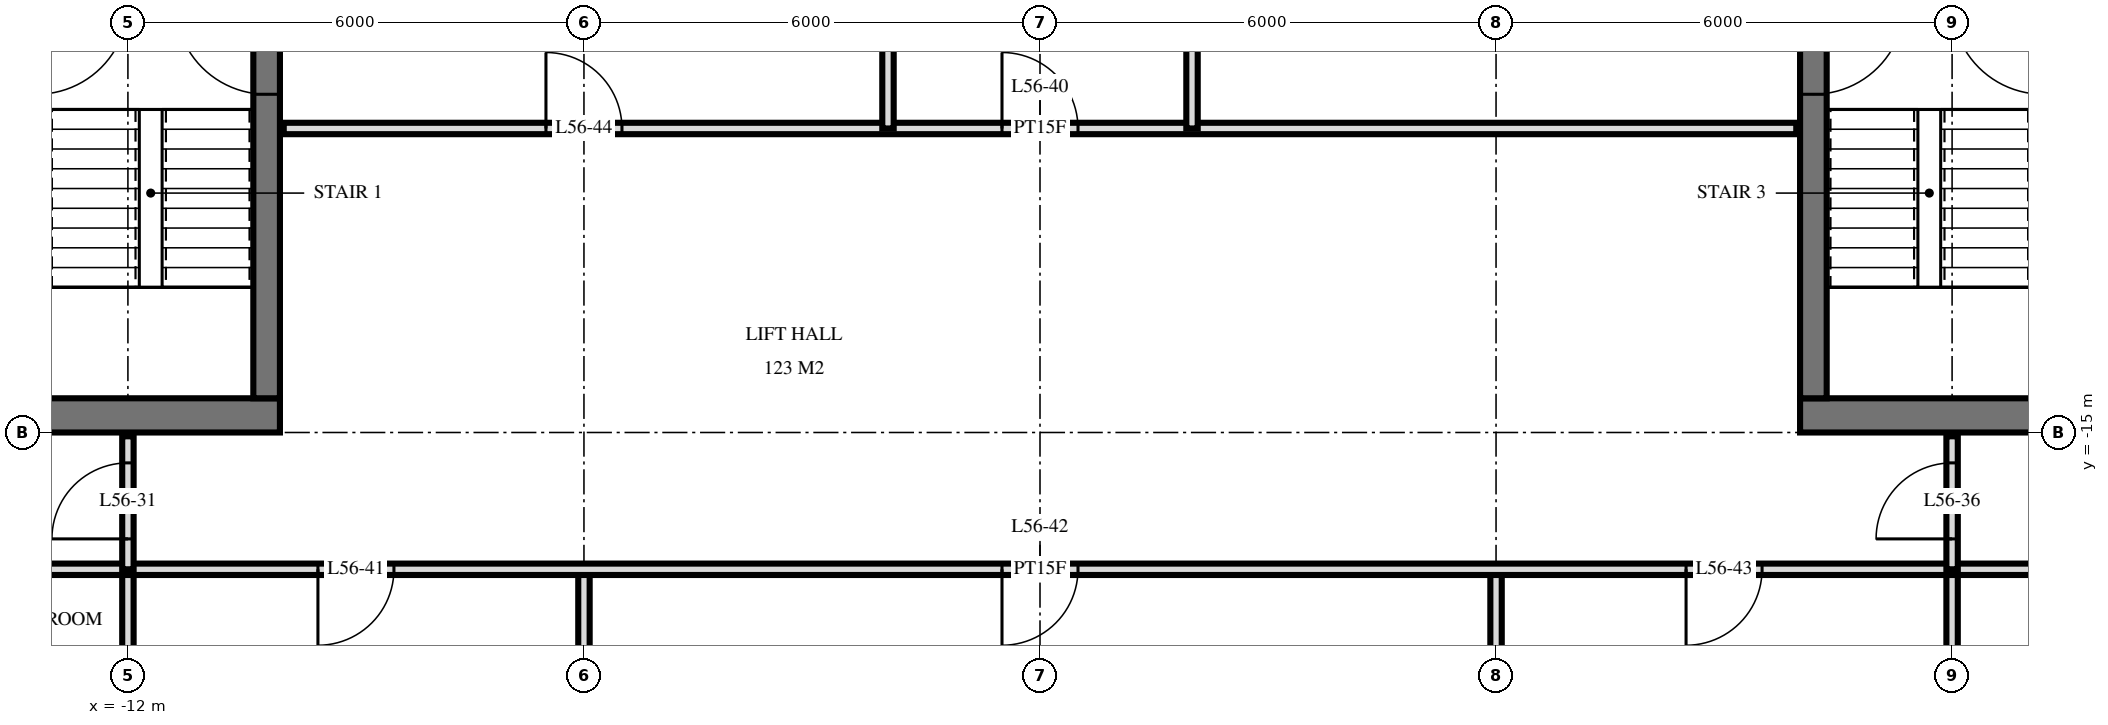
"""IFC4 building model, lengths in metres.
Left out: names, types, materials, properties, quantities, classifications, styles, units other than length and angle.
Written with IfcOpenShell. Run it as: python <this file> out.ifc"""

import sys

from ifc_helpers import new_model, si_unit, direction, frame, frame_2d, origin, place, context, subcontext, project, spatial, rectangle, extrude, element, fill, save


model = new_model("IFC4")
c1 = context("Model", 3, precision=1e-05, world=origin(), true_north=direction((0.0, 1.0)))
c2 = subcontext(c1, "Body", "Model", "MODEL_VIEW")
j1 = project(units=[si_unit("LENGTHUNIT", "METRE"), si_unit("PLANEANGLEUNIT", "RADIAN")], contexts=[c1])
p1 = place(None, origin())
s1 = spatial("IfcSite", under=j1, at=p1, CompositionType="ELEMENT")
p2 = place(p1, origin())
s2 = spatial("IfcBuilding", under=s1, at=p2, CompositionType="ELEMENT")
p3 = place(p2, frame((0.0, 0.0, 215.1)))
s3 = spatial("IfcBuildingStorey", under=s2, at=p3, CompositionType="ELEMENT", Elevation=215.1)
p4 = place(p3, frame((-24.5, -14.775, 0.0), z_axis=(0.0, 0.0, 1.0), x_axis=(1.0, 0.0, 0.0)))
e1 = element("IfcWall", 1, at=p4, inside=s3, PredefinedType="SHEAR", context=c2, shape_type="SweptSolid", body=[
    extrude(rectangle(XDim=14.5, YDim=0.45, at=frame_2d((7.25, 0.0))), origin(), (0.0, 0.0, 1.0), 3.5),
])
p5 = place(p4, frame((6.2, 0.0, 0.0)))
e2 = element("IfcOpeningElement", 2, at=p5, cuts=e1, PredefinedType="OPENING", context=c2, shape_type="SweptSolid", body=[
    extrude(rectangle(XDim=1.2, YDim=2.1, at=frame_2d((0.6, 1.05))), frame((0.0, 0.235, 0.0), z_axis=(0.0, -1.0, 0.0), x_axis=(1.0, 0.0, 0.0)), (0.0, 0.0, 1.0), 0.47),
])
p6 = place(p4, frame((9.25, 0.0, 0.0)))
e3 = element("IfcOpeningElement", 3, at=p6, cuts=e1, PredefinedType="OPENING", context=c2, shape_type="SweptSolid", body=[
    extrude(rectangle(XDim=1.1, YDim=2.1, at=frame_2d((0.55, 1.05))), frame((0.0, 0.235, 0.0), z_axis=(0.0, -1.0, 0.0), x_axis=(1.0, 0.0, 0.0)), (0.0, 0.0, 1.0), 0.47),
])
p7 = place(p4, frame((3.5, 0.0, 0.0)))
e4 = element("IfcOpeningElement", 4, at=p7, cuts=e1, PredefinedType="OPENING", context=c2, shape_type="SweptSolid", body=[
    extrude(rectangle(XDim=0.9, YDim=2.1, at=frame_2d((0.45, 1.05))), frame((0.0, 0.235, 0.0), z_axis=(0.0, -1.0, 0.0), x_axis=(1.0, 0.0, 0.0)), (0.0, 0.0, 1.0), 0.47),
])
p8 = place(p4, frame((1.05, 0.0, 0.0)))
e5 = element("IfcOpeningElement", 5, at=p8, cuts=e1, PredefinedType="OPENING", context=c2, shape_type="SweptSolid", body=[
    extrude(rectangle(XDim=1.0, YDim=2.1, at=frame_2d((0.5, 1.05))), frame((0.0, 0.235, 0.0), z_axis=(0.0, -1.0, 0.0), x_axis=(1.0, 0.0, 0.0)), (0.0, 0.0, 1.0), 0.47),
])
p9 = place(p3, frame((-10.175, -14.55, 0.0), z_axis=(0.0, 0.0, 1.0), x_axis=(0.0, 1.0, 0.0)))
e6 = element("IfcWall", 6, at=p9, inside=s3, PredefinedType="SHEAR", context=c2, shape_type="SweptSolid", body=[
    extrude(rectangle(XDim=14.1, YDim=0.35, at=frame_2d((7.05, 0.0))), origin(), (0.0, 0.0, 1.0), 3.5),
])
p10 = place(p9, frame((8.4, 0.0, 0.0)))
e7 = element("IfcOpeningElement", 7, at=p10, cuts=e6, PredefinedType="OPENING", context=c2, shape_type="SweptSolid", body=[
    extrude(rectangle(XDim=1.4, YDim=2.4, at=frame_2d((0.7, 1.2))), frame((0.0, 0.185, 0.0), z_axis=(0.0, -1.0, 0.0), x_axis=(1.0, 0.0, 0.0)), (0.0, 0.0, 1.0), 0.37),
])
p11 = place(p9, frame((10.0, 0.0, 0.0)))
e8 = element("IfcOpeningElement", 8, at=p11, cuts=e6, PredefinedType="OPENING", context=c2, shape_type="SweptSolid", body=[
    extrude(rectangle(XDim=1.4, YDim=2.4, at=frame_2d((0.7, 1.2))), frame((0.0, 0.185, 0.0), z_axis=(0.0, -1.0, 0.0), x_axis=(1.0, 0.0, 0.0)), (0.0, 0.0, 1.0), 0.37),
])
p12 = place(p9, frame((4.0, 0.0, 0.0)))
e9 = element("IfcOpeningElement", 9, at=p12, cuts=e6, PredefinedType="OPENING", context=c2, shape_type="SweptSolid", body=[
    extrude(rectangle(XDim=1.2, YDim=2.1, at=frame_2d((0.6, 1.05))), frame((0.0, 0.185, 0.0), z_axis=(0.0, -1.0, 0.0), x_axis=(1.0, 0.0, 0.0)), (0.0, 0.0, 1.0), 0.37),
])
p13 = place(p3, frame((10.0, -14.775, 0.0), z_axis=(0.0, 0.0, 1.0), x_axis=(1.0, 0.0, 0.0)))
e10 = element("IfcWall", 10, at=p13, inside=s3, PredefinedType="SHEAR", context=c2, shape_type="SweptSolid", body=[
    extrude(rectangle(XDim=14.5, YDim=0.45, at=frame_2d((7.25, 0.0))), origin(), (0.0, 0.0, 1.0), 3.5),
])
p14 = place(p13, frame((7.1, 0.0, 0.0)))
e11 = element("IfcOpeningElement", 11, at=p14, cuts=e10, PredefinedType="OPENING", context=c2, shape_type="SweptSolid", body=[
    extrude(rectangle(XDim=1.2, YDim=2.1, at=frame_2d((0.6, 1.05))), frame((0.0, 0.235, 0.0), z_axis=(0.0, -1.0, 0.0), x_axis=(1.0, 0.0, 0.0)), (0.0, 0.0, 1.0), 0.47),
])
p15 = place(p13, frame((4.15, 0.0, 0.0)))
e12 = element("IfcOpeningElement", 12, at=p15, cuts=e10, PredefinedType="OPENING", context=c2, shape_type="SweptSolid", body=[
    extrude(rectangle(XDim=1.1, YDim=2.1, at=frame_2d((0.55, 1.05))), frame((0.0, 0.235, 0.0), z_axis=(0.0, -1.0, 0.0), x_axis=(1.0, 0.0, 0.0)), (0.0, 0.0, 1.0), 0.47),
])
p16 = place(p13, frame((10.1, 0.0, 0.0)))
e13 = element("IfcOpeningElement", 13, at=p16, cuts=e10, PredefinedType="OPENING", context=c2, shape_type="SweptSolid", body=[
    extrude(rectangle(XDim=0.9, YDim=2.1, at=frame_2d((0.45, 1.05))), frame((0.0, 0.235, 0.0), z_axis=(0.0, -1.0, 0.0), x_axis=(1.0, 0.0, 0.0)), (0.0, 0.0, 1.0), 0.47),
])
p17 = place(p13, frame((12.45, 0.0, 0.0)))
e14 = element("IfcOpeningElement", 14, at=p17, cuts=e10, PredefinedType="OPENING", context=c2, shape_type="SweptSolid", body=[
    extrude(rectangle(XDim=1.0, YDim=2.1, at=frame_2d((0.5, 1.05))), frame((0.0, 0.235, 0.0), z_axis=(0.0, -1.0, 0.0), x_axis=(1.0, 0.0, 0.0)), (0.0, 0.0, 1.0), 0.47),
])
p18 = place(p3, frame((10.175, -14.55, 0.0), z_axis=(0.0, 0.0, 1.0), x_axis=(0.0, 1.0, 0.0)))
e15 = element("IfcWall", 15, at=p18, inside=s3, PredefinedType="SHEAR", context=c2, shape_type="SweptSolid", body=[
    extrude(rectangle(XDim=14.1, YDim=0.35, at=frame_2d((7.05, 0.0))), origin(), (0.0, 0.0, 1.0), 3.5),
])
p19 = place(p18, frame((8.4, 0.0, 0.0)))
e16 = element("IfcOpeningElement", 16, at=p19, cuts=e15, PredefinedType="OPENING", context=c2, shape_type="SweptSolid", body=[
    extrude(rectangle(XDim=1.4, YDim=2.4, at=frame_2d((0.7, 1.2))), frame((0.0, 0.185, 0.0), z_axis=(0.0, -1.0, 0.0), x_axis=(1.0, 0.0, 0.0)), (0.0, 0.0, 1.0), 0.37),
])
p20 = place(p18, frame((10.0, 0.0, 0.0)))
e17 = element("IfcOpeningElement", 17, at=p20, cuts=e15, PredefinedType="OPENING", context=c2, shape_type="SweptSolid", body=[
    extrude(rectangle(XDim=1.4, YDim=2.4, at=frame_2d((0.7, 1.2))), frame((0.0, 0.185, 0.0), z_axis=(0.0, -1.0, 0.0), x_axis=(1.0, 0.0, 0.0)), (0.0, 0.0, 1.0), 0.37),
])
p21 = place(p18, frame((4.0, 0.0, 0.0)))
e18 = element("IfcOpeningElement", 18, at=p21, cuts=e15, PredefinedType="OPENING", context=c2, shape_type="SweptSolid", body=[
    extrude(rectangle(XDim=1.2, YDim=2.1, at=frame_2d((0.6, 1.05))), frame((0.0, 0.185, 0.0), z_axis=(0.0, -1.0, 0.0), x_axis=(1.0, 0.0, 0.0)), (0.0, 0.0, 1.0), 0.37),
])
p22 = place(p3, frame((12.0, -16.8, 0.0), z_axis=(0.0, 0.0, 1.0), x_axis=(0.0, 1.0, 0.0)))
e19 = element("IfcWall", 19, at=p22, inside=s3, PredefinedType="PARTITIONING", context=c2, shape_type="SweptSolid", body=[
    extrude(rectangle(XDim=1.75, YDim=0.15, at=frame_2d((0.875, 0.0))), origin(), (0.0, 0.0, 1.0), 3.22),
])
p23 = place(p22, frame((0.4, 0.0, 0.0)))
e20 = element("IfcOpeningElement", 20, at=p23, cuts=e19, PredefinedType="OPENING", context=c2, shape_type="SweptSolid", body=[
    extrude(rectangle(XDim=1.0, YDim=2.1, at=frame_2d((0.5, 1.05))), frame((0.0, 0.085, 0.0), z_axis=(0.0, -1.0, 0.0), x_axis=(1.0, 0.0, 0.0)), (0.0, 0.0, 1.0), 0.17),
])
for number, where, z_axis, x_axis in (
    (21, (12.0, -29.22, 0.0), (0.0, 0.0, 1.0), (0.0, 1.0, 0.0)),
    (22, (6.0, -29.22, 0.0), (0.0, 0.0, 1.0), (0.0, 1.0, 0.0)),
):
    element("IfcWall", number, at=place(p3, frame(where, z_axis=z_axis, x_axis=x_axis)), inside=s3, PredefinedType="PARTITIONING", context=c2, shape_type="SweptSolid", body=[
        extrude(rectangle(XDim=12.42, YDim=0.15, at=frame_2d((6.21, 0.0))), origin(), (0.0, 0.0, 1.0), 3.22),
    ])
for number, where, z_axis, x_axis in (
    (23, (2.0, -11.0, 0.0), (0.0, 0.0, 1.0), (0.0, 1.0, 0.0)),
    (24, (-2.0, -11.0, 0.0), (0.0, 0.0, 1.0), (0.0, 1.0, 0.0)),
):
    element("IfcWall", number, at=place(p3, frame(where, z_axis=z_axis, x_axis=x_axis)), inside=s3, PredefinedType="PARTITIONING", context=c2, shape_type="SweptSolid", body=[
        extrude(rectangle(XDim=4.0, YDim=0.15, at=frame_2d((2.0, 0.0))), origin(), (0.0, 0.0, 1.0), 3.22),
    ])
p24 = place(p3, frame((-6.0, -29.22, 0.0), z_axis=(0.0, 0.0, 1.0), x_axis=(0.0, 1.0, 0.0)))
e25 = element("IfcWall", 25, at=p24, inside=s3, PredefinedType="PARTITIONING", context=c2, shape_type="SweptSolid", body=[
    extrude(rectangle(XDim=12.42, YDim=0.15, at=frame_2d((6.21, 0.0))), origin(), (0.0, 0.0, 1.0), 3.22),
])
p25 = place(p3, frame((-12.0, -16.8, 0.0), z_axis=(0.0, 0.0, 1.0), x_axis=(0.0, 1.0, 0.0)))
e26 = element("IfcWall", 26, at=p25, inside=s3, PredefinedType="PARTITIONING", context=c2, shape_type="SweptSolid", body=[
    extrude(rectangle(XDim=1.75, YDim=0.15, at=frame_2d((0.875, 0.0))), origin(), (0.0, 0.0, 1.0), 3.22),
])
p26 = place(p25, frame((0.4, 0.0, 0.0)))
e27 = element("IfcOpeningElement", 27, at=p26, cuts=e26, PredefinedType="OPENING", context=c2, shape_type="SweptSolid", body=[
    extrude(rectangle(XDim=1.0, YDim=2.1, at=frame_2d((0.5, 1.05))), frame((0.0, 0.085, 0.0), z_axis=(0.0, -1.0, 0.0), x_axis=(1.0, 0.0, 0.0)), (0.0, 0.0, 1.0), 0.17),
])
p27 = place(p3, frame((-12.0, -29.22, 0.0), z_axis=(0.0, 0.0, 1.0), x_axis=(0.0, 1.0, 0.0)))
e28 = element("IfcWall", 28, at=p27, inside=s3, PredefinedType="PARTITIONING", context=c2, shape_type="SweptSolid", body=[
    extrude(rectangle(XDim=12.42, YDim=0.15, at=frame_2d((6.21, 0.0))), origin(), (0.0, 0.0, 1.0), 3.22),
])
p28 = place(p3, frame((-26.82, -16.8, 0.0), z_axis=(0.0, 0.0, 1.0), x_axis=(1.0, 0.0, 0.0)))
e29 = element("IfcWall", 29, at=p28, inside=s3, PredefinedType="PARTITIONING", context=c2, shape_type="SweptSolid", body=[
    extrude(rectangle(XDim=53.64, YDim=0.15, at=frame_2d((26.82, 0.0))), origin(), (0.0, 0.0, 1.0), 3.22),
])
p29 = place(p28, frame((11.17, 0.0, 0.0)))
e30 = element("IfcOpeningElement", 30, at=p29, cuts=e29, PredefinedType="OPENING", context=c2, shape_type="SweptSolid", body=[
    extrude(rectangle(XDim=1.0, YDim=2.1, at=frame_2d((0.5, 1.05))), frame((0.0, 0.085, 0.0), z_axis=(0.0, -1.0, 0.0), x_axis=(1.0, 0.0, 0.0)), (0.0, 0.0, 1.0), 0.17),
])
p30 = place(p28, frame((3.22, 0.0, 0.0)))
e31 = element("IfcOpeningElement", 31, at=p30, cuts=e29, PredefinedType="OPENING", context=c2, shape_type="SweptSolid", body=[
    extrude(rectangle(XDim=1.0, YDim=2.1, at=frame_2d((0.5, 1.05))), frame((0.0, 0.085, 0.0), z_axis=(0.0, -1.0, 0.0), x_axis=(1.0, 0.0, 0.0)), (0.0, 0.0, 1.0), 0.17),
])
p31 = place(p28, frame((5.02, 0.0, 0.0)))
e32 = element("IfcOpeningElement", 32, at=p31, cuts=e29, PredefinedType="OPENING", context=c2, shape_type="SweptSolid", body=[
    extrude(rectangle(XDim=1.0, YDim=2.1, at=frame_2d((0.5, 1.05))), frame((0.0, 0.085, 0.0), z_axis=(0.0, -1.0, 0.0), x_axis=(1.0, 0.0, 0.0)), (0.0, 0.0, 1.0), 0.17),
])
p32 = place(p28, frame((47.72, 0.0, 0.0)))
e33 = element("IfcOpeningElement", 33, at=p32, cuts=e29, PredefinedType="OPENING", context=c2, shape_type="SweptSolid", body=[
    extrude(rectangle(XDim=1.0, YDim=2.1, at=frame_2d((0.5, 1.05))), frame((0.0, 0.085, 0.0), z_axis=(0.0, -1.0, 0.0), x_axis=(1.0, 0.0, 0.0)), (0.0, 0.0, 1.0), 0.17),
])
p33 = place(p28, frame((51.04, 0.0, 0.0)))
e34 = element("IfcOpeningElement", 34, at=p33, cuts=e29, PredefinedType="OPENING", context=c2, shape_type="SweptSolid", body=[
    extrude(rectangle(XDim=1.0, YDim=2.1, at=frame_2d((0.5, 1.05))), frame((0.0, 0.085, 0.0), z_axis=(0.0, -1.0, 0.0), x_axis=(1.0, 0.0, 0.0)), (0.0, 0.0, 1.0), 0.17),
])
p34 = place(p28, frame((17.32, 0.0, 0.0)))
e35 = element("IfcOpeningElement", 35, at=p34, cuts=e29, PredefinedType="OPENING", context=c2, shape_type="SweptSolid", body=[
    extrude(rectangle(XDim=1.0, YDim=2.1, at=frame_2d((0.5, 1.05))), frame((0.0, 0.085, 0.0), z_axis=(0.0, -1.0, 0.0), x_axis=(1.0, 0.0, 0.0)), (0.0, 0.0, 1.0), 0.17),
])
p35 = place(p28, frame((26.32, 0.0, 0.0)))
e36 = element("IfcOpeningElement", 36, at=p35, cuts=e29, PredefinedType="OPENING", context=c2, shape_type="SweptSolid", body=[
    extrude(rectangle(XDim=1.0, YDim=2.1, at=frame_2d((0.5, 1.05))), frame((0.0, 0.085, 0.0), z_axis=(0.0, -1.0, 0.0), x_axis=(1.0, 0.0, 0.0)), (0.0, 0.0, 1.0), 0.17),
])
p36 = place(p28, frame((35.32, 0.0, 0.0)))
e37 = element("IfcOpeningElement", 37, at=p36, cuts=e29, PredefinedType="OPENING", context=c2, shape_type="SweptSolid", body=[
    extrude(rectangle(XDim=1.0, YDim=2.1, at=frame_2d((0.5, 1.05))), frame((0.0, 0.085, 0.0), z_axis=(0.0, -1.0, 0.0), x_axis=(1.0, 0.0, 0.0)), (0.0, 0.0, 1.0), 0.17),
])
p37 = place(p3, frame((-9.95, -11.0, 0.0), z_axis=(0.0, 0.0, 1.0), x_axis=(1.0, 0.0, 0.0)))
e38 = element("IfcWall", 38, at=p37, inside=s3, PredefinedType="PARTITIONING", context=c2, shape_type="SweptSolid", body=[
    extrude(rectangle(XDim=19.9, YDim=0.15, at=frame_2d((9.95, 0.0))), origin(), (0.0, 0.0, 1.0), 3.22),
])
p38 = place(p37, frame((9.45, 0.0, 0.0)))
e39 = element("IfcOpeningElement", 39, at=p38, cuts=e38, PredefinedType="OPENING", context=c2, shape_type="SweptSolid", body=[
    extrude(rectangle(XDim=1.0, YDim=2.1, at=frame_2d((0.5, 1.05))), frame((0.0, 0.085, 0.0), z_axis=(0.0, -1.0, 0.0), x_axis=(1.0, 0.0, 0.0)), (0.0, 0.0, 1.0), 0.17),
])
p39 = place(p37, frame((3.45, 0.0, 0.0)))
e40 = element("IfcOpeningElement", 40, at=p39, cuts=e38, PredefinedType="OPENING", context=c2, shape_type="SweptSolid", body=[
    extrude(rectangle(XDim=1.0, YDim=2.1, at=frame_2d((0.5, 1.05))), frame((0.0, 0.085, 0.0), z_axis=(0.0, -1.0, 0.0), x_axis=(1.0, 0.0, 0.0)), (0.0, 0.0, 1.0), 0.17),
])
p40 = place(p12, origin())
e41 = element("IfcDoor", 41, at=p40, inside=s3, OperationType="SINGLE_SWING_LEFT", PredefinedType="DOOR", context=c2, shape_type="SweptSolid", body=[
    extrude(rectangle(XDim=1.2, YDim=2.1, at=frame_2d((0.6, 1.05))), frame((0.0, 0.025, 0.0), z_axis=(0.0, -1.0, 0.0), x_axis=(1.0, 0.0, 0.0)), (0.0, 0.0, 1.0), 0.05),
])
fill(e9, e41)
p41 = place(p21, frame((0.6, 0.0, 0.0), z_axis=(0.0, 0.0, 1.0), x_axis=(-1.0, 0.0, 0.0)))
e42 = element("IfcDoor", 42, at=p41, inside=s3, OperationType="SINGLE_SWING_RIGHT", PredefinedType="DOOR", context=c2, shape_type="SweptSolid", body=[
    extrude(rectangle(XDim=1.2, YDim=2.1, at=frame_2d((0.0, 1.05))), frame((0.0, -0.025, 0.0), z_axis=(0.0, 1.0, 0.0), x_axis=(-1.0, 0.0, 0.0)), (0.0, 0.0, 1.0), 0.05),
])
fill(e18, e42)
p42 = place(p26, origin())
e43 = element("IfcDoor", 43, at=p42, inside=s3, OperationType="SINGLE_SWING_RIGHT", PredefinedType="DOOR", context=c2, shape_type="SweptSolid", body=[
    extrude(rectangle(XDim=1.0, YDim=2.1, at=frame_2d((0.5, 1.05))), frame((0.0, 0.025, 0.0), z_axis=(0.0, -1.0, 0.0), x_axis=(1.0, 0.0, 0.0)), (0.0, 0.0, 1.0), 0.05),
])
fill(e27, e43)
p43 = place(p23, origin())
e44 = element("IfcDoor", 44, at=p43, inside=s3, OperationType="SINGLE_SWING_RIGHT", PredefinedType="DOOR", context=c2, shape_type="SweptSolid", body=[
    extrude(rectangle(XDim=1.0, YDim=2.1, at=frame_2d((0.5, 1.05))), frame((0.0, 0.025, 0.0), z_axis=(0.0, -1.0, 0.0), x_axis=(1.0, 0.0, 0.0)), (0.0, 0.0, 1.0), 0.05),
])
fill(e20, e44)
p44 = place(p38, origin())
e45 = element("IfcDoor", 45, at=p44, inside=s3, OperationType="SINGLE_SWING_RIGHT", PredefinedType="DOOR", context=c2, shape_type="SweptSolid", body=[
    extrude(rectangle(XDim=1.0, YDim=2.1, at=frame_2d((0.5, 1.05))), frame((0.0, 0.025, 0.0), z_axis=(0.0, -1.0, 0.0), x_axis=(1.0, 0.0, 0.0)), (0.0, 0.0, 1.0), 0.05),
])
fill(e39, e45)
p45 = place(p34, frame((0.5, 0.0, 0.0), z_axis=(0.0, 0.0, 1.0), x_axis=(-1.0, 0.0, 0.0)))
e46 = element("IfcDoor", 46, at=p45, inside=s3, OperationType="SINGLE_SWING_LEFT", PredefinedType="DOOR", context=c2, shape_type="SweptSolid", body=[
    extrude(rectangle(XDim=1.0, YDim=2.1, at=frame_2d((0.0, 1.05))), frame((0.0, -0.025, 0.0), z_axis=(0.0, 1.0, 0.0), x_axis=(-1.0, 0.0, 0.0)), (0.0, 0.0, 1.0), 0.05),
])
fill(e35, e46)
p46 = place(p35, frame((0.5, 0.0, 0.0), z_axis=(0.0, 0.0, 1.0), x_axis=(-1.0, 0.0, 0.0)))
e47 = element("IfcDoor", 47, at=p46, inside=s3, OperationType="SINGLE_SWING_LEFT", PredefinedType="DOOR", context=c2, shape_type="SweptSolid", body=[
    extrude(rectangle(XDim=1.0, YDim=2.1, at=frame_2d((0.0, 1.05))), frame((0.0, -0.025, 0.0), z_axis=(0.0, 1.0, 0.0), x_axis=(-1.0, 0.0, 0.0)), (0.0, 0.0, 1.0), 0.05),
])
fill(e36, e47)
p47 = place(p36, frame((0.5, 0.0, 0.0), z_axis=(0.0, 0.0, 1.0), x_axis=(-1.0, 0.0, 0.0)))
e48 = element("IfcDoor", 48, at=p47, inside=s3, OperationType="SINGLE_SWING_LEFT", PredefinedType="DOOR", context=c2, shape_type="SweptSolid", body=[
    extrude(rectangle(XDim=1.0, YDim=2.1, at=frame_2d((0.0, 1.05))), frame((0.0, -0.025, 0.0), z_axis=(0.0, 1.0, 0.0), x_axis=(-1.0, 0.0, 0.0)), (0.0, 0.0, 1.0), 0.05),
])
fill(e37, e48)
p48 = place(p39, origin())
e49 = element("IfcDoor", 49, at=p48, inside=s3, OperationType="SINGLE_SWING_RIGHT", PredefinedType="DOOR", context=c2, shape_type="SweptSolid", body=[
    extrude(rectangle(XDim=1.0, YDim=2.1, at=frame_2d((0.5, 1.05))), frame((0.0, 0.025, 0.0), z_axis=(0.0, -1.0, 0.0), x_axis=(1.0, 0.0, 0.0)), (0.0, 0.0, 1.0), 0.05),
])
fill(e40, e49)
save(model, sys.argv[1])
